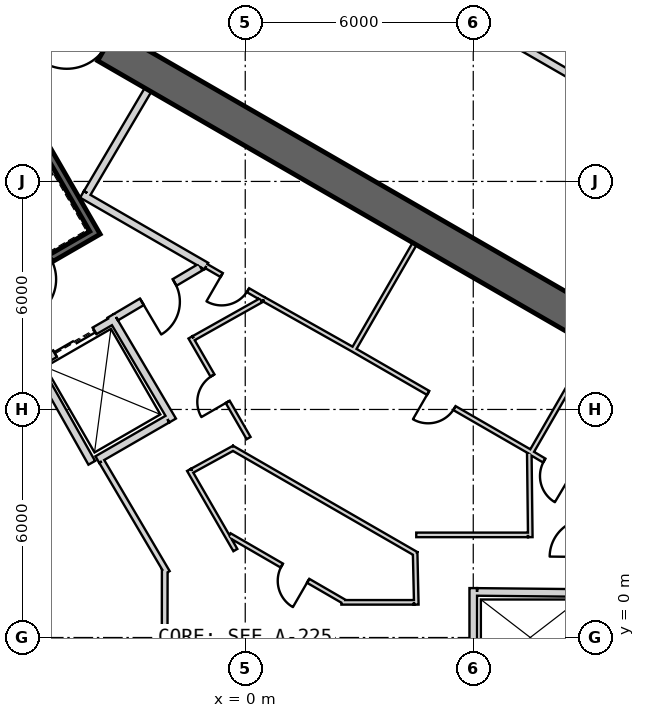
"""IFC4 building model, lengths in metres.
Left out: names, types, materials, properties, quantities, classifications, styles, units other than length and angle.
Written with IfcOpenShell. Run it as: python <this file> out.ifc"""

import sys

from ifc_helpers import new_model, si_unit, direction, frame, frame_2d, origin, place, context, subcontext, project, spatial, rectangle, extrude, element, fill, save


model = new_model("IFC4")
c1 = context("Model", 3, precision=1e-05, world=origin(), true_north=direction((0.0, 1.0)))
c2 = subcontext(c1, "Body", "Model", "MODEL_VIEW")
j1 = project(units=[si_unit("LENGTHUNIT", "METRE"), si_unit("PLANEANGLEUNIT", "RADIAN")], contexts=[c1])
p1 = place(None, origin())
s1 = spatial("IfcSite", under=j1, at=p1, CompositionType="ELEMENT")
p2 = place(p1, origin())
s2 = spatial("IfcBuilding", under=s1, at=p2, CompositionType="ELEMENT")
p3 = place(p2, frame((0.0, 0.0, 217.2)))
s3 = spatial("IfcBuildingStorey", under=s2, at=p3, CompositionType="ELEMENT", Elevation=217.2)
p4 = place(p3, frame((19.475, 2.208, 0.0), z_axis=(0.0, 0.0, 1.0), x_axis=(-0.866028369851, 0.499994862586, 0.0)))
e1 = element("IfcWall", 1, at=p4, inside=s3, PredefinedType="SHEAR", context=c2, shape_type="SweptSolid", body=[
    extrude(rectangle(XDim=31.523, YDim=0.9, at=frame_2d((15.762, 0.0))), origin(), (0.0, 0.0, 1.0), 4.0),
])
p5 = place(p4, frame((7.062, 0.0, 0.0)))
e2 = element("IfcOpeningElement", 2, at=p5, cuts=e1, PredefinedType="OPENING", context=c2, shape_type="SweptSolid", body=[
    extrude(rectangle(XDim=1.2, YDim=2.4, at=frame_2d((0.6, 1.2))), frame((0.0, 0.46, 0.0), z_axis=(0.0, -1.0, 0.0), x_axis=(1.0, 0.0, 0.0)), (0.0, 0.0, 1.0), 0.92),
])
p6 = place(p4, frame((3.612, 0.0, 0.0)))
e3 = element("IfcOpeningElement", 3, at=p6, cuts=e1, PredefinedType="OPENING", context=c2, shape_type="SweptSolid", body=[
    extrude(rectangle(XDim=1.2, YDim=2.4, at=frame_2d((0.6, 1.2))), frame((0.0, 0.46, 0.0), z_axis=(0.0, -1.0, 0.0), x_axis=(1.0, 0.0, 0.0)), (0.0, 0.0, 1.0), 0.92),
])
p7 = place(p4, frame((26.712, 0.0, 0.0)))
e4 = element("IfcOpeningElement", 4, at=p7, cuts=e1, PredefinedType="OPENING", context=c2, shape_type="SweptSolid", body=[
    extrude(rectangle(XDim=1.2, YDim=2.4, at=frame_2d((0.6, 1.2))), frame((0.0, 0.46, 0.0), z_axis=(0.0, -1.0, 0.0), x_axis=(1.0, 0.0, 0.0)), (0.0, 0.0, 1.0), 0.92),
])
p8 = place(p3, frame((6.0, -1.014, 0.0), z_axis=(0.0, 0.0, 1.0), x_axis=(0.0, 1.0, 0.0)))
e5 = element("IfcWall", 5, at=p8, inside=s3, PredefinedType="PLUMBINGWALL", context=c2, shape_type="SweptSolid", body=[
    extrude(rectangle(XDim=2.314, YDim=0.2, at=frame_2d((1.157, 0.0))), origin(), (0.0, 0.0, 1.0), 3.7),
])
p9 = place(p3, frame((9.1, 1.169, 0.0), z_axis=(0.0, 0.0, 1.0), x_axis=(-0.99994990606, 0.010009264196, 0.0)))
e6 = element("IfcWall", 6, at=p9, inside=s3, PredefinedType="PLUMBINGWALL", context=c2, shape_type="SweptSolid", body=[
    extrude(rectangle(XDim=3.0, YDim=0.2, at=frame_2d((1.5, 0.0))), origin(), (0.0, 0.0, 1.0), 3.7),
])
p10 = place(p3, frame((-7.854, 17.405, -0.3), z_axis=(0.0, 0.0, 1.0), x_axis=(0.499997992926, -0.866026562566, 0.0)))
e7 = element("IfcWall", 7, at=p10, inside=s3, PredefinedType="SHEAR", context=c2, shape_type="SweptSolid", body=[
    extrude(rectangle(XDim=7.9, YDim=0.2, at=frame_2d((3.95, 0.0))), origin(), (0.0, 0.0, 1.0), 4.0),
])
p11 = place(p3, frame((-7.159, 8.8, -0.3), z_axis=(0.0, 0.0, 1.0), x_axis=(0.866047807691, 0.499961193289, 0.0)))
e8 = element("IfcWall", 8, at=p11, inside=s3, PredefinedType="SHEAR", context=c2, shape_type="SweptSolid", body=[
    extrude(rectangle(XDim=3.6, YDim=0.2, at=frame_2d((1.8, 0.0))), origin(), (0.0, 0.0, 1.0), 4.0),
])
p12 = place(p11, frame((1.25, 0.0, 0.3)))
e9 = element("IfcOpeningElement", 9, at=p12, cuts=e8, PredefinedType="OPENING", context=c2, shape_type="SweptSolid", body=[
    extrude(rectangle(XDim=1.1, YDim=2.1, at=frame_2d((0.55, 1.05))), frame((0.0, 0.11, 0.0), z_axis=(0.0, -1.0, 0.0), x_axis=(1.0, 0.0, 0.0)), (0.0, 0.0, 1.0), 0.22),
])
p13 = place(p3, frame((-5.524, 7.168, 0.0), z_axis=(0.0, 0.0, 1.0), x_axis=(0.866024647952, 0.500001309137, 0.0)))
e10 = element("IfcWall", 10, at=p13, inside=s3, PredefinedType="PLUMBINGWALL", context=c2, shape_type="SweptSolid", body=[
    extrude(rectangle(XDim=2.4, YDim=0.2, at=frame_2d((1.2, 0.0))), origin(), (0.0, 0.0, 1.0), 3.7),
])
p14 = place(p13, frame((0.6, 0.0, 0.0)))
e11 = element("IfcOpeningElement", 11, at=p14, cuts=e10, PredefinedType="OPENING", context=c2, shape_type="SweptSolid", body=[
    extrude(rectangle(XDim=1.2, YDim=2.4, at=frame_2d((0.6, 1.2))), frame((0.0, 0.11, 0.0), z_axis=(0.0, -1.0, 0.0), x_axis=(1.0, 0.0, 0.0)), (0.0, 0.0, 1.0), 0.22),
])
p15 = place(p3, frame((-4.039, 4.596, 0.0), z_axis=(0.0, 0.0, 1.0), x_axis=(-0.491322718731, 0.870977603649, 0.0)))
e12 = element("IfcWall", 12, at=p15, inside=s3, PredefinedType="PLUMBINGWALL", context=c2, shape_type="SweptSolid", body=[
    extrude(rectangle(XDim=3.1, YDim=0.2, at=frame_2d((1.55, 0.0))), origin(), (0.0, 0.0, 1.0), 3.7),
])
p16 = place(p3, frame((-3.538, 8.465, 0.0), z_axis=(0.0, 0.0, 1.0), x_axis=(0.508616218331, -0.860993346345, 0.0)))
e13 = element("IfcWall", 13, at=p16, inside=s3, PredefinedType="PLUMBINGWALL", context=c2, shape_type="SweptSolid", body=[
    extrude(rectangle(XDim=3.2, YDim=0.2, at=frame_2d((1.6, 0.0))), origin(), (0.0, 0.0, 1.0), 3.7),
])
p17 = place(p3, frame((-2.047, 5.746, 0.0), z_axis=(0.0, 0.0, 1.0), x_axis=(-0.866040491692, -0.499973866067, 0.0)))
e14 = element("IfcWall", 14, at=p17, inside=s3, PredefinedType="PLUMBINGWALL", context=c2, shape_type="SweptSolid", body=[
    extrude(rectangle(XDim=2.129, YDim=0.2, at=frame_2d((1.065, 0.0))), origin(), (0.0, 0.0, 1.0), 3.7),
])
p18 = place(p3, frame((7.508, 4.845, 0.0), z_axis=(0.0, 0.0, 1.0), x_axis=(0.500017246033, 0.866015446554, 0.0)))
e15 = element("IfcWall", 15, at=p18, inside=s3, PredefinedType="PARTITIONING", context=c2, shape_type="SweptSolid", body=[
    extrude(rectangle(XDim=3.25, YDim=0.12, at=frame_2d((1.625, 0.0))), origin(), (0.0, 0.0, 1.0), 3.7),
])
p19 = place(p3, frame((7.493, 4.878, 0.0), z_axis=(0.0, 0.0, 1.0), x_axis=(0.8599829515, -0.510322763679, 0.0)))
e16 = element("IfcWall", 16, at=p19, inside=s3, PredefinedType="PARTITIONING", context=c2, shape_type="SweptSolid", body=[
    extrude(rectangle(XDim=1.672, YDim=0.12, at=frame_2d((0.836, 0.0))), origin(), (0.0, 0.0, 1.0), 3.7),
])
p20 = place(p19, frame((0.436, 0.0, 0.0)))
e17 = element("IfcOpeningElement", 17, at=p20, cuts=e16, PredefinedType="OPENING", context=c2, shape_type="SweptSolid", body=[
    extrude(rectangle(XDim=0.8, YDim=2.1, at=frame_2d((0.4, 1.05))), frame((0.0, 0.07, 0.0), z_axis=(0.0, -1.0, 0.0), x_axis=(1.0, 0.0, 0.0)), (0.0, 0.0, 1.0), 0.14),
])
p21 = place(p3, frame((2.832, 7.545, 0.0), z_axis=(0.0, 0.0, 1.0), x_axis=(0.500017246033, 0.866015446554, 0.0)))
e18 = element("IfcWall", 18, at=p21, inside=s3, PredefinedType="PARTITIONING", context=c2, shape_type="SweptSolid", body=[
    extrude(rectangle(XDim=3.25, YDim=0.12, at=frame_2d((1.625, 0.0))), origin(), (0.0, 0.0, 1.0), 3.7),
])
p22 = place(p3, frame((7.497, 4.886, 0.0), z_axis=(0.0, 0.0, 1.0), x_axis=(-0.866028230842, 0.499995103361, 0.0)))
e19 = element("IfcWall", 19, at=p22, inside=s3, PredefinedType="PARTITIONING", context=c2, shape_type="SweptSolid", body=[
    extrude(rectangle(XDim=5.4, YDim=0.12, at=frame_2d((2.7, 0.0))), origin(), (0.0, 0.0, 1.0), 3.7),
])
p23 = place(p22, frame((2.3, 0.0, 0.0)))
e20 = element("IfcOpeningElement", 20, at=p23, cuts=e19, PredefinedType="OPENING", context=c2, shape_type="SweptSolid", body=[
    extrude(rectangle(XDim=0.8, YDim=2.1, at=frame_2d((0.4, 1.05))), frame((0.0, 0.07, 0.0), z_axis=(0.0, -1.0, 0.0), x_axis=(1.0, 0.0, 0.0)), (0.0, 0.0, 1.0), 0.14),
])
p24 = place(p3, frame((-4.296, 11.66, 0.0), z_axis=(0.0, 0.0, 1.0), x_axis=(0.866027389382, -0.499996560828, 0.0)))
e21 = element("IfcWall", 21, at=p24, inside=s3, PredefinedType="PARTITIONING", context=c2, shape_type="SweptSolid", body=[
    extrude(rectangle(XDim=3.778, YDim=0.2, at=frame_2d((1.889, 0.0))), origin(), (0.0, 0.0, 1.0), 3.7),
])
p25 = place(p3, frame((-2.558, 14.409, 0.0), z_axis=(0.0, 0.0, 1.0), x_axis=(-0.508018930956, -0.861345903683, 0.0)))
e22 = element("IfcWall", 22, at=p25, inside=s3, PredefinedType="PARTITIONING", context=c2, shape_type="SweptSolid", body=[
    extrude(rectangle(XDim=3.15, YDim=0.2, at=frame_2d((1.575, 0.0))), origin(), (0.0, 0.0, 1.0), 3.7),
])
p26 = place(p3, frame((2.821, 7.586, 0.0), z_axis=(0.0, 0.0, 1.0), x_axis=(-0.871426548871, 0.490526013503, 0.0)))
e23 = element("IfcWall", 23, at=p26, inside=s3, PredefinedType="PARTITIONING", context=c2, shape_type="SweptSolid", body=[
    extrude(rectangle(XDim=2.67, YDim=0.12, at=frame_2d((1.335, 0.0))), origin(), (0.0, 0.0, 1.0), 3.7),
])
p27 = place(p3, frame((-1.024, 9.771, 0.0), z_axis=(0.0, 0.0, 1.0), x_axis=(0.866039397417, -0.499975761534, 0.0)))
e24 = element("IfcWall", 24, at=p27, inside=s3, PredefinedType="PARTITIONING", context=c2, shape_type="SweptSolid", body=[
    extrude(rectangle(XDim=1.752, YDim=0.12, at=frame_2d((0.876, 0.0))), origin(), (0.0, 0.0, 1.0), 3.7),
])
p28 = place(p27, frame((0.466, 0.0, 0.0)))
e25 = element("IfcOpeningElement", 25, at=p28, cuts=e24, PredefinedType="OPENING", context=c2, shape_type="SweptSolid", body=[
    extrude(rectangle(XDim=0.8, YDim=2.1, at=frame_2d((0.4, 1.05))), frame((0.0, 0.07, 0.0), z_axis=(0.0, -1.0, 0.0), x_axis=(1.0, 0.0, 0.0)), (0.0, 0.0, 1.0), 0.14),
])
p29 = place(p3, frame((-1.179, 9.745, 0.0), z_axis=(0.0, 0.0, 1.0), x_axis=(-0.860630814782, -0.509229418482, 0.0)))
e26 = element("IfcWall", 26, at=p29, inside=s3, PredefinedType="PARTITIONING", context=c2, shape_type="SweptSolid", body=[
    extrude(rectangle(XDim=2.582, YDim=0.2, at=frame_2d((1.291, 0.0))), origin(), (0.0, 0.0, 1.0), 3.7),
])
p30 = place(p29, frame((0.791, 0.0, 0.0)))
e27 = element("IfcOpeningElement", 27, at=p30, cuts=e26, PredefinedType="OPENING", context=c2, shape_type="SweptSolid", body=[
    extrude(rectangle(XDim=1.0, YDim=2.1, at=frame_2d((0.5, 1.05))), frame((0.0, 0.11, 0.0), z_axis=(0.0, -1.0, 0.0), x_axis=(1.0, 0.0, 0.0)), (0.0, 0.0, 1.0), 0.22),
])
p31 = place(p3, frame((-2.053, 1.709, 0.0), z_axis=(0.0, 0.0, 1.0), x_axis=(-0.507570243425, 0.861610380618, 0.0)))
e28 = element("IfcWall", 28, at=p31, inside=s3, PredefinedType="PLUMBINGWALL", context=c2, shape_type="SweptSolid", body=[
    extrude(rectangle(XDim=3.394, YDim=0.15, at=frame_2d((1.697, 0.0))), origin(), (0.0, 0.0, 1.0), 3.7),
])
p32 = place(p3, frame((-2.122, -1.67, 0.0), z_axis=(0.0, 0.0, 1.0), x_axis=(0.00126831916, 0.999999195683, 0.0)))
e29 = element("IfcWall", 29, at=p32, inside=s3, PredefinedType="PLUMBINGWALL", context=c2, shape_type="SweptSolid", body=[
    extrude(rectangle(XDim=3.465, YDim=0.15, at=frame_2d((1.732, 0.0))), origin(), (0.0, 0.0, 1.0), 3.7),
])
p33 = place(p3, frame((-0.351, 4.994, 0.0), z_axis=(0.0, 0.0, 1.0), x_axis=(0.866277754418, -0.499562660935, 0.0)))
e30 = element("IfcWall", 30, at=p33, inside=s3, PredefinedType="PARTITIONING", context=c2, shape_type="SweptSolid", body=[
    extrude(rectangle(XDim=5.6, YDim=0.12, at=frame_2d((2.8, 0.0))), origin(), (0.0, 0.0, 1.0), 3.7),
])
p34 = place(p3, frame((4.501, 0.865, 0.0), z_axis=(0.0, 0.0, 1.0), x_axis=(-0.022315079617, 0.999750987607, 0.0)))
e31 = element("IfcWall", 31, at=p34, inside=s3, PredefinedType="PARTITIONING", context=c2, shape_type="SweptSolid", body=[
    extrude(rectangle(XDim=1.378, YDim=0.12, at=frame_2d((0.689, 0.0))), origin(), (0.0, 0.0, 1.0), 3.7),
])
p35 = place(p3, frame((2.53, 0.925, 0.0), z_axis=(0.0, 0.0, 1.0), x_axis=(1.0, 0.0, 0.0)))
e32 = element("IfcWall", 32, at=p35, inside=s3, PredefinedType="PARTITIONING", context=c2, shape_type="SweptSolid", body=[
    extrude(rectangle(XDim=1.91, YDim=0.12, at=frame_2d((0.955, 0.0))), origin(), (0.0, 0.0, 1.0), 3.7),
])
p36 = place(p3, frame((-0.416, 2.691, 0.0), z_axis=(0.0, 0.0, 1.0), x_axis=(0.865413570885, -0.501058231473, 0.0)))
e33 = element("IfcWall", 33, at=p36, inside=s3, PredefinedType="PARTITIONING", context=c2, shape_type="SweptSolid", body=[
    extrude(rectangle(XDim=3.506, YDim=0.12, at=frame_2d((1.753, 0.0))), origin(), (0.0, 0.0, 1.0), 3.7),
])
p37 = place(p36, frame((1.594, 0.0, 0.0)))
e34 = element("IfcOpeningElement", 34, at=p37, cuts=e33, PredefinedType="OPENING", context=c2, shape_type="SweptSolid", body=[
    extrude(rectangle(XDim=0.8, YDim=2.1, at=frame_2d((0.4, 1.05))), frame((0.0, 0.07, 0.0), z_axis=(0.0, -1.0, 0.0), x_axis=(1.0, 0.0, 0.0)), (0.0, 0.0, 1.0), 0.14),
])
p38 = place(p3, frame((-1.479, 4.412, 0.0), z_axis=(0.0, 0.0, 1.0), x_axis=(0.50003736129, -0.866003832159, 0.0)))
e35 = element("IfcWall", 35, at=p38, inside=s3, PredefinedType="PARTITIONING", context=c2, shape_type="SweptSolid", body=[
    extrude(rectangle(XDim=2.438, YDim=0.12, at=frame_2d((1.219, 0.0))), origin(), (0.0, 0.0, 1.0), 3.7),
])
p39 = place(p3, frame((-0.295, 4.992, 0.0), z_axis=(0.0, 0.0, 1.0), x_axis=(-0.87699482268, -0.480499824134, 0.0)))
e36 = element("IfcWall", 36, at=p39, inside=s3, PredefinedType="PARTITIONING", context=c2, shape_type="SweptSolid", body=[
    extrude(rectangle(XDim=1.256, YDim=0.12, at=frame_2d((0.628, 0.0))), origin(), (0.0, 0.0, 1.0), 3.7),
])
p40 = place(p3, frame((-1.442, 7.897, 0.0), z_axis=(0.0, 0.0, 1.0), x_axis=(0.499991792115, -0.866030142557, 0.0)))
e37 = element("IfcWall", 37, at=p40, inside=s3, PredefinedType="PARTITIONING", context=c2, shape_type="SweptSolid", body=[
    extrude(rectangle(XDim=3.06, YDim=0.12, at=frame_2d((1.53, 0.0))), origin(), (0.0, 0.0, 1.0), 3.7),
])
p41 = place(p40, frame((1.16, 0.0, 0.0)))
e38 = element("IfcOpeningElement", 38, at=p41, cuts=e37, PredefinedType="OPENING", context=c2, shape_type="SweptSolid", body=[
    extrude(rectangle(XDim=0.8, YDim=2.1, at=frame_2d((0.4, 1.05))), frame((0.0, 0.07, 0.0), z_axis=(0.0, -1.0, 0.0), x_axis=(1.0, 0.0, 0.0)), (0.0, 0.0, 1.0), 0.14),
])
p42 = place(p3, frame((0.414, 8.871, 0.0), z_axis=(0.0, 0.0, 1.0), x_axis=(-0.871809386997, -0.48984527429, 0.0)))
e39 = element("IfcWall", 39, at=p42, inside=s3, PredefinedType="PARTITIONING", context=c2, shape_type="SweptSolid", body=[
    extrude(rectangle(XDim=2.034, YDim=0.12, at=frame_2d((1.017, 0.0))), origin(), (0.0, 0.0, 1.0), 3.7),
])
p43 = place(p3, frame((7.501, 2.64, 0.0), z_axis=(0.0, 0.0, 1.0), x_axis=(-0.01174194727, 0.999931060961, 0.0)))
e40 = element("IfcWall", 40, at=p43, inside=s3, PredefinedType="PARTITIONING", context=c2, shape_type="SweptSolid", body=[
    extrude(rectangle(XDim=2.225, YDim=0.12, at=frame_2d((1.112, 0.0))), origin(), (0.0, 0.0, 1.0), 3.7),
])
p44 = place(p3, frame((4.5, 2.7, 0.0), z_axis=(0.0, 0.0, 1.0), x_axis=(1.0, 0.0, 0.0)))
e41 = element("IfcWall", 41, at=p44, inside=s3, PredefinedType="PARTITIONING", context=c2, shape_type="SweptSolid", body=[
    extrude(rectangle(XDim=2.94, YDim=0.12, at=frame_2d((1.47, 0.0))), origin(), (0.0, 0.0, 1.0), 3.7),
])
p45 = place(p3, frame((10.325, 13.784, 0.0), z_axis=(0.0, 0.0, 1.0), x_axis=(-0.866025119466, 0.500000492453, 0.0)))
e42 = element("IfcWall", 42, at=p45, inside=s3, PredefinedType="PARTITIONING", context=c2, shape_type="SweptSolid", body=[
    extrude(rectangle(XDim=18.673, YDim=0.2, at=frame_2d((9.336, 0.0))), origin(), (0.0, 0.0, 1.0), 2.88),
])
p46 = place(p45, frame((15.118, 0.0, 0.0)))
e43 = element("IfcOpeningElement", 43, at=p46, cuts=e42, PredefinedType="OPENING", context=c2, shape_type="SweptSolid", body=[
    extrude(rectangle(XDim=1.0, YDim=2.1, at=frame_2d((0.5, 1.05))), frame((0.0, 0.11, 0.0), z_axis=(0.0, -1.0, 0.0), x_axis=(1.0, 0.0, 0.0)), (0.0, 0.0, 1.0), 0.22),
])
p47 = place(p30, origin())
e44 = element("IfcDoor", 44, at=p47, inside=s3, OperationType="SINGLE_SWING_LEFT", PredefinedType="USERDEFINED", context=c2, shape_type="SweptSolid", body=[
    extrude(rectangle(XDim=1.0, YDim=2.1, at=frame_2d((0.5, 1.05))), frame((0.0, 0.025, 0.0), z_axis=(0.0, -1.0, 0.0), x_axis=(1.0, 0.0, 0.0)), (0.0, 0.0, 1.0), 0.05),
])
fill(e27, e44)
p48 = place(p14, origin())
e45 = element("IfcDoor", 45, at=p48, inside=s3, OperationType="SLIDING_TO_LEFT", PredefinedType="USERDEFINED", context=c2, shape_type="SweptSolid", body=[
    extrude(rectangle(XDim=1.2, YDim=2.4, at=frame_2d((0.6, 1.2))), frame((0.0, 0.025, 0.0), z_axis=(0.0, -1.0, 0.0), x_axis=(1.0, 0.0, 0.0)), (0.0, 0.0, 1.0), 0.05),
])
fill(e11, e45)
p49 = place(p37, origin())
e46 = element("IfcDoor", 46, at=p49, inside=s3, OperationType="SINGLE_SWING_RIGHT", PredefinedType="USERDEFINED", context=c2, shape_type="SweptSolid", body=[
    extrude(rectangle(XDim=0.8, YDim=2.1, at=frame_2d((0.4, 1.05))), frame((0.0, 0.025, 0.0), z_axis=(0.0, -1.0, 0.0), x_axis=(1.0, 0.0, 0.0)), (0.0, 0.0, 1.0), 0.05),
])
fill(e34, e46)
p50 = place(p41, origin())
e47 = element("IfcDoor", 47, at=p50, inside=s3, OperationType="SINGLE_SWING_LEFT", PredefinedType="USERDEFINED", context=c2, shape_type="SweptSolid", body=[
    extrude(rectangle(XDim=0.8, YDim=2.1, at=frame_2d((0.4, 1.05))), frame((0.0, 0.025, 0.0), z_axis=(0.0, -1.0, 0.0), x_axis=(1.0, 0.0, 0.0)), (0.0, 0.0, 1.0), 0.05),
])
fill(e38, e47)
p51 = place(p20, origin())
e48 = element("IfcDoor", 48, at=p51, inside=s3, OperationType="SINGLE_SWING_RIGHT", PredefinedType="USERDEFINED", context=c2, shape_type="SweptSolid", body=[
    extrude(rectangle(XDim=0.8, YDim=2.1, at=frame_2d((0.4, 1.05))), frame((0.0, 0.025, 0.0), z_axis=(0.0, -1.0, 0.0), x_axis=(1.0, 0.0, 0.0)), (0.0, 0.0, 1.0), 0.05),
])
fill(e17, e48)
p52 = place(p23, origin())
e49 = element("IfcDoor", 49, at=p52, inside=s3, OperationType="SINGLE_SWING_LEFT", PredefinedType="USERDEFINED", context=c2, shape_type="SweptSolid", body=[
    extrude(rectangle(XDim=0.8, YDim=2.1, at=frame_2d((0.4, 1.05))), frame((0.0, 0.025, 0.0), z_axis=(0.0, -1.0, 0.0), x_axis=(1.0, 0.0, 0.0)), (0.0, 0.0, 1.0), 0.05),
])
fill(e20, e49)
p53 = place(p28, origin())
e50 = element("IfcDoor", 50, at=p53, inside=s3, OperationType="SINGLE_SWING_RIGHT", PredefinedType="USERDEFINED", context=c2, shape_type="SweptSolid", body=[
    extrude(rectangle(XDim=0.8, YDim=2.1, at=frame_2d((0.4, 1.05))), frame((0.0, 0.025, 0.0), z_axis=(0.0, -1.0, 0.0), x_axis=(1.0, 0.0, 0.0)), (0.0, 0.0, 1.0), 0.05),
])
fill(e25, e50)
save(model, sys.argv[1])
